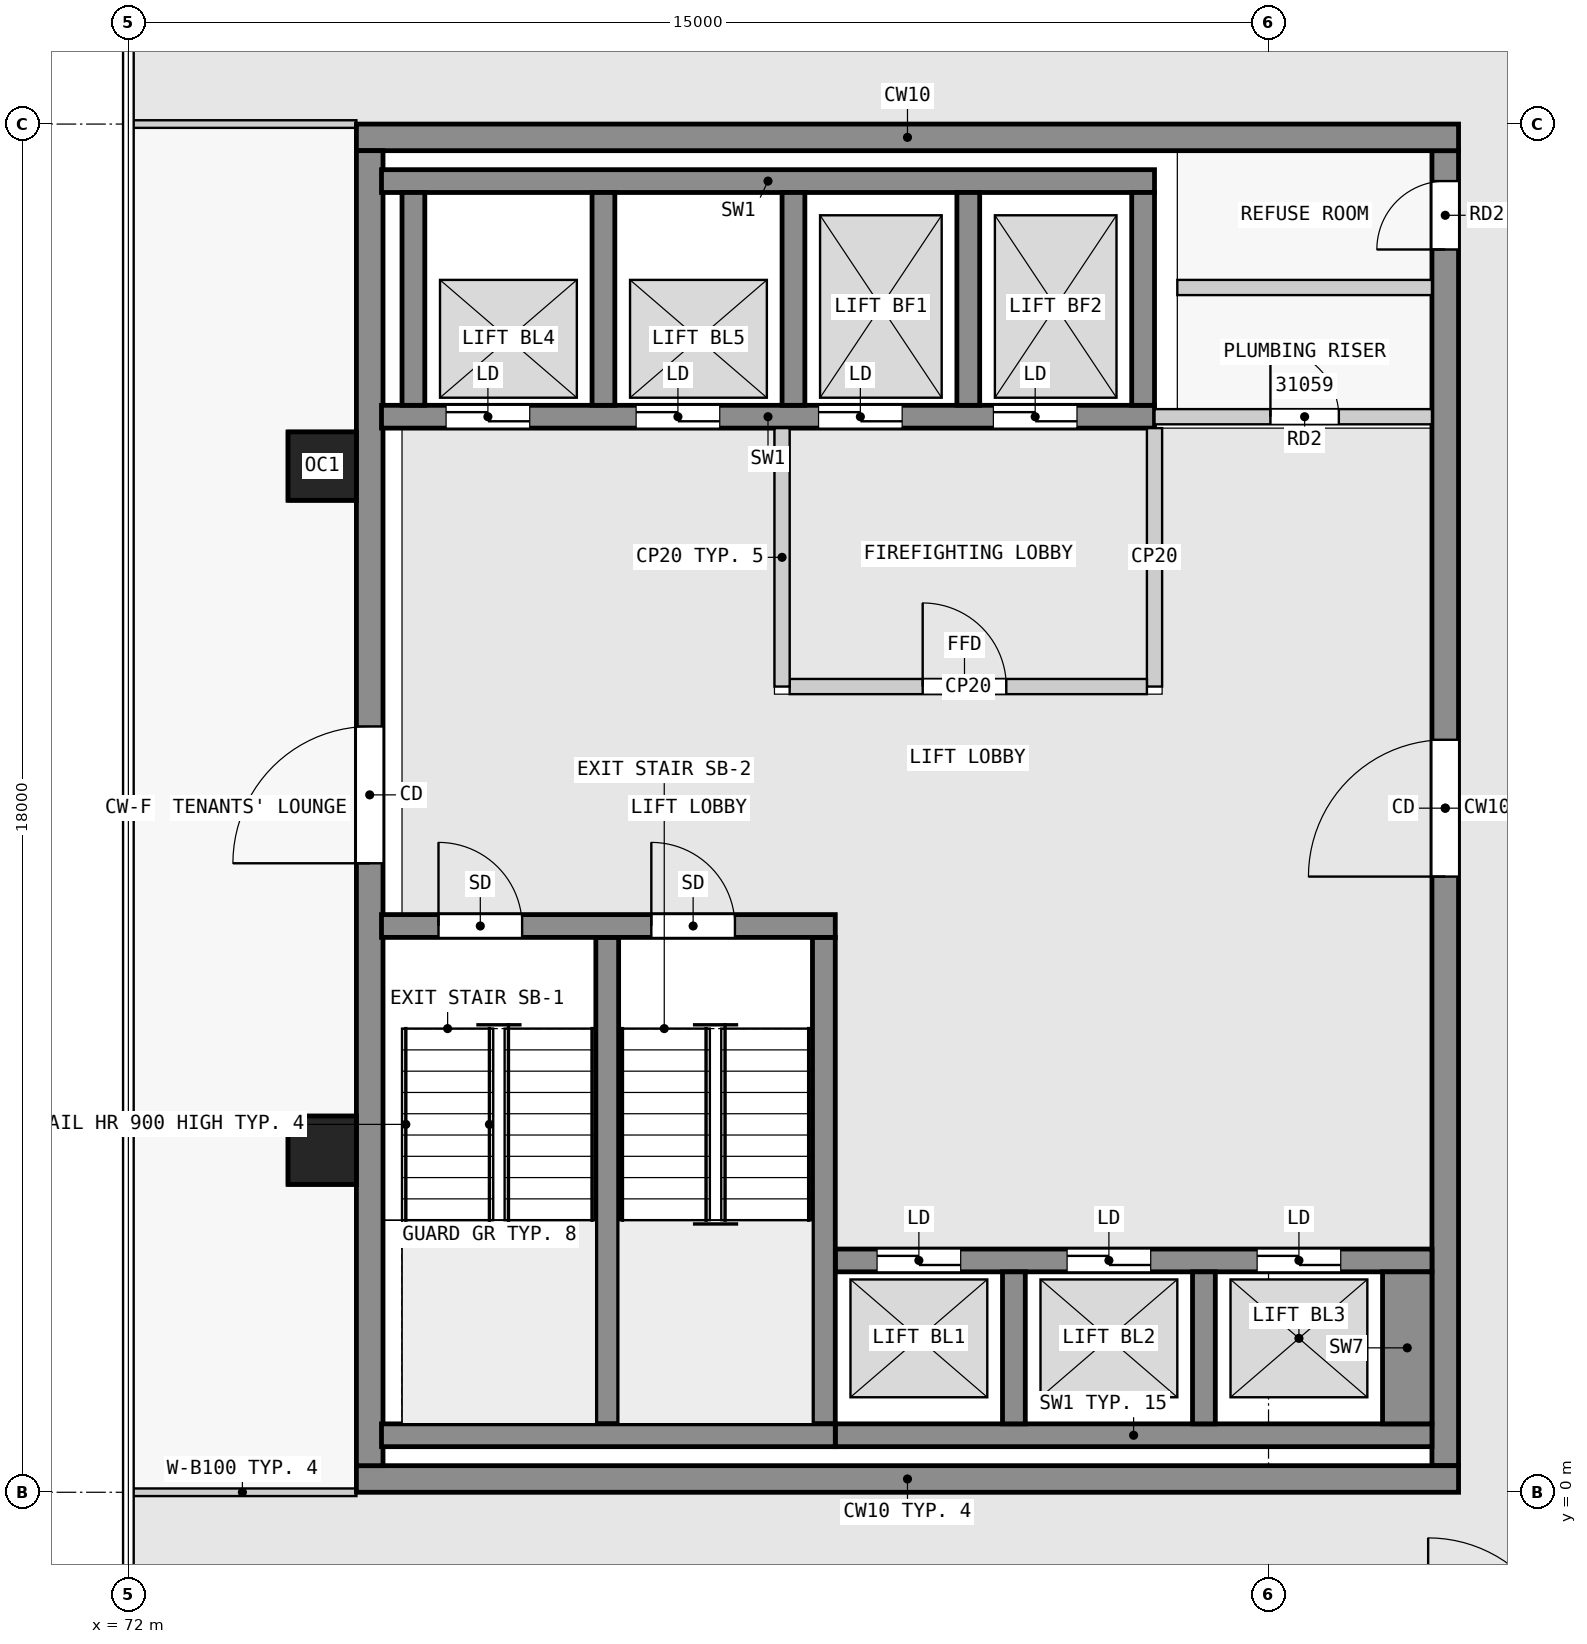
"""IFC4 building model, lengths in metres.
Left out: names, types, materials, properties, quantities, classifications, styles, units other than length and angle.
Written with IfcOpenShell. Run it as: python <this file> out.ifc"""

import sys

from ifc_helpers import new_model, si_unit, direction, frame, frame_2d, origin, origin_2d, place, context, subcontext, project, spatial, rectangle, extrude, element, fill, save


model = new_model("IFC4")
c1 = context("Model", 3, precision=1e-05, world=origin(), true_north=direction((0.0, 1.0)))
c2 = subcontext(c1, "Body", "Model", "MODEL_VIEW")
j1 = project(units=[si_unit("LENGTHUNIT", "METRE"), si_unit("PLANEANGLEUNIT", "RADIAN")], contexts=[c1])
p1 = place(None, origin())
s1 = spatial("IfcSite", under=j1, at=p1, CompositionType="ELEMENT")
p2 = place(p1, origin())
s2 = spatial("IfcBuilding", under=s1, at=p2, CompositionType="ELEMENT")
p3 = place(p2, frame((0.0, 0.0, 120.3)))
s3 = spatial("IfcBuildingStorey", under=s2, at=p3, CompositionType="ELEMENT", Elevation=120.3)
for number, where, z_axis, x_axis in (
    (1, (74.55, 13.5, 0.0), (0.0, 0.0, 1.0), (1.0, 0.0, 0.0)),
    (2, (74.55, 4.5, 0.0), (0.0, 0.0, 1.0), (1.0, 0.0, 0.0)),
):
    element("IfcColumn", number, at=place(p3, frame(where, z_axis=z_axis, x_axis=x_axis)), inside=s3, PredefinedType="COLUMN", context=c2, shape_type="SweptSolid", body=[
        extrude(rectangle(XDim=0.9, YDim=0.9, at=origin_2d()), origin(), (0.0, 0.0, 1.0), 3.5),
    ])
for number, where, z_axis, x_axis in (
    (3, (75.0, 0.175, 0.0), (0.0, 0.0, 1.0), (1.0, 0.0, 0.0)),
    (4, (75.0, 17.825, 0.0), (0.0, 0.0, 1.0), (1.0, 0.0, 0.0)),
):
    element("IfcWall", number, at=place(p3, frame(where, z_axis=z_axis, x_axis=x_axis)), inside=s3, PredefinedType="SHEAR", context=c2, shape_type="SweptSolid", body=[
        extrude(rectangle(XDim=14.5, YDim=0.35, at=frame_2d((7.25, 0.0))), origin(), (0.0, 0.0, 1.0), 3.2),
    ])
p4 = place(p3, frame((75.175, 0.35, 0.0), z_axis=(0.0, 0.0, 1.0), x_axis=(0.0, 1.0, 0.0)))
e5 = element("IfcWall", 5, at=p4, inside=s3, PredefinedType="SHEAR", context=c2, shape_type="SweptSolid", body=[
    extrude(rectangle(XDim=17.3, YDim=0.35, at=frame_2d((8.65, 0.0))), origin(), (0.0, 0.0, 1.0), 3.2),
])
p5 = place(p4, frame((7.925, 0.0, 0.0)))
e6 = element("IfcOpeningElement", 6, at=p5, cuts=e5, PredefinedType="OPENING", context=c2, shape_type="SweptSolid", body=[
    extrude(rectangle(XDim=1.8, YDim=2.1, at=frame_2d((0.9, 1.05))), frame((0.0, 0.185, 0.0), z_axis=(0.0, -1.0, 0.0), x_axis=(1.0, 0.0, 0.0)), (0.0, 0.0, 1.0), 0.37),
])
p6 = place(p3, frame((89.325, 0.35, 0.0), z_axis=(0.0, 0.0, 1.0), x_axis=(0.0, 1.0, 0.0)))
e7 = element("IfcWall", 7, at=p6, inside=s3, PredefinedType="SHEAR", context=c2, shape_type="SweptSolid", body=[
    extrude(rectangle(XDim=17.3, YDim=0.35, at=frame_2d((8.65, 0.0))), origin(), (0.0, 0.0, 1.0), 3.2),
])
p7 = place(p6, frame((7.75, 0.0, 0.0)))
e8 = element("IfcOpeningElement", 8, at=p7, cuts=e7, PredefinedType="OPENING", context=c2, shape_type="SweptSolid", body=[
    extrude(rectangle(XDim=1.8, YDim=2.1, at=frame_2d((0.9, 1.05))), frame((0.0, 0.185, 0.0), z_axis=(0.0, -1.0, 0.0), x_axis=(1.0, 0.0, 0.0)), (0.0, 0.0, 1.0), 0.37),
])
p8 = place(p6, frame((16.0, 0.0, 0.0)))
e9 = element("IfcOpeningElement", 9, at=p8, cuts=e7, PredefinedType="OPENING", context=c2, shape_type="SweptSolid", body=[
    extrude(rectangle(XDim=0.9, YDim=2.1, at=frame_2d((0.45, 1.05))), frame((0.0, 0.185, 0.0), z_axis=(0.0, -1.0, 0.0), x_axis=(1.0, 0.0, 0.0)), (0.0, 0.0, 1.0), 0.37),
])
p9 = place(p3, frame((75.33, 0.75, 0.0), z_axis=(0.0, 0.0, 1.0), x_axis=(1.0, 0.0, 0.0)))
e10 = element("IfcWall", 10, at=p9, inside=s3, PredefinedType="SHEAR", context=c2, shape_type="SweptSolid", body=[
    extrude(rectangle(XDim=5.97, YDim=0.3, at=frame_2d((2.985, 0.0))), origin(), (0.0, 0.0, 1.0), 3.2),
])
p10 = place(p3, frame((75.33, 7.45, 0.0), z_axis=(0.0, 0.0, 1.0), x_axis=(1.0, 0.0, 0.0)))
e11 = element("IfcWall", 11, at=p10, inside=s3, PredefinedType="SHEAR", context=c2, shape_type="SweptSolid", body=[
    extrude(rectangle(XDim=5.97, YDim=0.3, at=frame_2d((2.985, 0.0))), origin(), (0.0, 0.0, 1.0), 3.2),
])
p11 = place(p10, frame((0.75, 0.0, 0.0)))
e12 = element("IfcOpeningElement", 12, at=p11, cuts=e11, PredefinedType="OPENING", context=c2, shape_type="SweptSolid", body=[
    extrude(rectangle(XDim=1.1, YDim=2.1, at=frame_2d((0.55, 1.05))), frame((0.0, 0.16, 0.0), z_axis=(0.0, -1.0, 0.0), x_axis=(1.0, 0.0, 0.0)), (0.0, 0.0, 1.0), 0.32),
])
p12 = place(p10, frame((3.55, 0.0, 0.0)))
e13 = element("IfcOpeningElement", 13, at=p12, cuts=e11, PredefinedType="OPENING", context=c2, shape_type="SweptSolid", body=[
    extrude(rectangle(XDim=1.1, YDim=2.1, at=frame_2d((0.55, 1.05))), frame((0.0, 0.16, 0.0), z_axis=(0.0, -1.0, 0.0), x_axis=(1.0, 0.0, 0.0)), (0.0, 0.0, 1.0), 0.32),
])
for number, where, z_axis, x_axis in (
    (14, (78.3, 0.9, 0.0), (0.0, 0.0, 1.0), (0.0, 1.0, 0.0)),
    (15, (81.15, 0.9, 0.0), (0.0, 0.0, 1.0), (0.0, 1.0, 0.0)),
):
    element("IfcWall", number, at=place(p3, frame(where, z_axis=z_axis, x_axis=x_axis)), inside=s3, PredefinedType="SHEAR", context=c2, shape_type="SweptSolid", body=[
        extrude(rectangle(XDim=6.4, YDim=0.3, at=frame_2d((3.2, 0.0))), origin(), (0.0, 0.0, 1.0), 3.2),
    ])
p13 = place(p3, frame((81.3, 0.75, 0.0), z_axis=(0.0, 0.0, 1.0), x_axis=(1.0, 0.0, 0.0)))
e16 = element("IfcWall", 16, at=p13, inside=s3, PredefinedType="SHEAR", context=c2, shape_type="SweptSolid", body=[
    extrude(rectangle(XDim=7.85, YDim=0.3, at=frame_2d((3.925, 0.0))), origin(), (0.0, 0.0, 1.0), 3.2),
])
for number, where, z_axis, x_axis in (
    (17, (83.65, 0.9, 0.0), (0.0, 0.0, 1.0), (0.0, 1.0, 0.0)),
    (18, (86.15, 0.9, 0.0), (0.0, 0.0, 1.0), (0.0, 1.0, 0.0)),
):
    element("IfcWall", number, at=place(p3, frame(where, z_axis=z_axis, x_axis=x_axis)), inside=s3, PredefinedType="SHEAR", context=c2, shape_type="SweptSolid", body=[
        extrude(rectangle(XDim=2.0, YDim=0.3, at=frame_2d((1.0, 0.0))), origin(), (0.0, 0.0, 1.0), 3.2),
    ])
p14 = place(p3, frame((88.825, 0.9, 0.0), z_axis=(0.0, 0.0, 1.0), x_axis=(0.0, 1.0, 0.0)))
e19 = element("IfcWall", 19, at=p14, inside=s3, PredefinedType="SHEAR", context=c2, shape_type="SweptSolid", body=[
    extrude(rectangle(XDim=2.0, YDim=0.65, at=frame_2d((1.0, 0.0))), origin(), (0.0, 0.0, 1.0), 3.2),
])
p15 = place(p3, frame((81.3, 3.05, 0.0), z_axis=(0.0, 0.0, 1.0), x_axis=(1.0, 0.0, 0.0)))
e20 = element("IfcWall", 20, at=p15, inside=s3, PredefinedType="SHEAR", context=c2, shape_type="SweptSolid", body=[
    extrude(rectangle(XDim=7.85, YDim=0.3, at=frame_2d((3.925, 0.0))), origin(), (0.0, 0.0, 1.0), 3.2),
])
p16 = place(p15, frame((0.55, 0.0, 0.0)))
e21 = element("IfcOpeningElement", 21, at=p16, cuts=e20, PredefinedType="OPENING", context=c2, shape_type="SweptSolid", body=[
    extrude(rectangle(XDim=1.1, YDim=2.1, at=frame_2d((0.55, 1.05))), frame((0.0, 0.16, 0.0), z_axis=(0.0, -1.0, 0.0), x_axis=(1.0, 0.0, 0.0)), (0.0, 0.0, 1.0), 0.32),
])
p17 = place(p15, frame((3.05, 0.0, 0.0)))
e22 = element("IfcOpeningElement", 22, at=p17, cuts=e20, PredefinedType="OPENING", context=c2, shape_type="SweptSolid", body=[
    extrude(rectangle(XDim=1.1, YDim=2.1, at=frame_2d((0.55, 1.05))), frame((0.0, 0.16, 0.0), z_axis=(0.0, -1.0, 0.0), x_axis=(1.0, 0.0, 0.0)), (0.0, 0.0, 1.0), 0.32),
])
p18 = place(p15, frame((5.55, 0.0, 0.0)))
e23 = element("IfcOpeningElement", 23, at=p18, cuts=e20, PredefinedType="OPENING", context=c2, shape_type="SweptSolid", body=[
    extrude(rectangle(XDim=1.1, YDim=2.1, at=frame_2d((0.55, 1.05))), frame((0.0, 0.16, 0.0), z_axis=(0.0, -1.0, 0.0), x_axis=(1.0, 0.0, 0.0)), (0.0, 0.0, 1.0), 0.32),
])
p19 = place(p3, frame((75.33, 17.25, 0.0), z_axis=(0.0, 0.0, 1.0), x_axis=(1.0, 0.0, 0.0)))
e24 = element("IfcWall", 24, at=p19, inside=s3, PredefinedType="SHEAR", context=c2, shape_type="SweptSolid", body=[
    extrude(rectangle(XDim=10.17, YDim=0.3, at=frame_2d((5.085, 0.0))), origin(), (0.0, 0.0, 1.0), 3.2),
])
p20 = place(p3, frame((75.33, 14.15, 0.0), z_axis=(0.0, 0.0, 1.0), x_axis=(1.0, 0.0, 0.0)))
e25 = element("IfcWall", 25, at=p20, inside=s3, PredefinedType="SHEAR", context=c2, shape_type="SweptSolid", body=[
    extrude(rectangle(XDim=10.17, YDim=0.3, at=frame_2d((5.085, 0.0))), origin(), (0.0, 0.0, 1.0), 3.2),
])
p21 = place(p20, frame((0.85, 0.0, 0.0)))
e26 = element("IfcOpeningElement", 26, at=p21, cuts=e25, PredefinedType="OPENING", context=c2, shape_type="SweptSolid", body=[
    extrude(rectangle(XDim=1.1, YDim=2.1, at=frame_2d((0.55, 1.05))), frame((0.0, 0.16, 0.0), z_axis=(0.0, -1.0, 0.0), x_axis=(1.0, 0.0, 0.0)), (0.0, 0.0, 1.0), 0.32),
])
p22 = place(p20, frame((3.35, 0.0, 0.0)))
e27 = element("IfcOpeningElement", 27, at=p22, cuts=e25, PredefinedType="OPENING", context=c2, shape_type="SweptSolid", body=[
    extrude(rectangle(XDim=1.1, YDim=2.1, at=frame_2d((0.55, 1.05))), frame((0.0, 0.16, 0.0), z_axis=(0.0, -1.0, 0.0), x_axis=(1.0, 0.0, 0.0)), (0.0, 0.0, 1.0), 0.32),
])
p23 = place(p20, frame((5.75, 0.0, 0.0)))
e28 = element("IfcOpeningElement", 28, at=p23, cuts=e25, PredefinedType="OPENING", context=c2, shape_type="SweptSolid", body=[
    extrude(rectangle(XDim=1.1, YDim=2.1, at=frame_2d((0.55, 1.05))), frame((0.0, 0.16, 0.0), z_axis=(0.0, -1.0, 0.0), x_axis=(1.0, 0.0, 0.0)), (0.0, 0.0, 1.0), 0.32),
])
p24 = place(p20, frame((8.05, 0.0, 0.0)))
e29 = element("IfcOpeningElement", 29, at=p24, cuts=e25, PredefinedType="OPENING", context=c2, shape_type="SweptSolid", body=[
    extrude(rectangle(XDim=1.1, YDim=2.1, at=frame_2d((0.55, 1.05))), frame((0.0, 0.16, 0.0), z_axis=(0.0, -1.0, 0.0), x_axis=(1.0, 0.0, 0.0)), (0.0, 0.0, 1.0), 0.32),
])
for number, where, z_axis, x_axis in (
    (30, (75.75, 14.3, 0.0), (0.0, 0.0, 1.0), (0.0, 1.0, 0.0)),
    (31, (78.25, 14.3, 0.0), (0.0, 0.0, 1.0), (0.0, 1.0, 0.0)),
    (32, (80.75, 14.3, 0.0), (0.0, 0.0, 1.0), (0.0, 1.0, 0.0)),
    (33, (83.05, 14.3, 0.0), (0.0, 0.0, 1.0), (0.0, 1.0, 0.0)),
    (34, (85.35, 14.3, 0.0), (0.0, 0.0, 1.0), (0.0, 1.0, 0.0)),
):
    element("IfcWall", number, at=place(p3, frame(where, z_axis=z_axis, x_axis=x_axis)), inside=s3, PredefinedType="SHEAR", context=c2, shape_type="SweptSolid", body=[
        extrude(rectangle(XDim=2.8, YDim=0.3, at=frame_2d((1.4, 0.0))), origin(), (0.0, 0.0, 1.0), 3.2),
    ])
p25 = place(p3, frame((80.6, 10.6, 0.0), z_axis=(0.0, 0.0, 1.0), x_axis=(0.0, 1.0, 0.0)))
e35 = element("IfcWall", 35, at=p25, inside=s3, PredefinedType="PARTITIONING", context=c2, shape_type="SweptSolid", body=[
    extrude(rectangle(XDim=3.4, YDim=0.2, at=frame_2d((1.7, 0.0))), origin(), (0.0, 0.0, 1.0), 3.2),
])
p26 = place(p3, frame((80.7, 10.6, 0.0), z_axis=(0.0, 0.0, 1.0), x_axis=(1.0, 0.0, 0.0)))
e36 = element("IfcWall", 36, at=p26, inside=s3, PredefinedType="PARTITIONING", context=c2, shape_type="SweptSolid", body=[
    extrude(rectangle(XDim=4.7, YDim=0.2, at=frame_2d((2.35, 0.0))), origin(), (0.0, 0.0, 1.0), 3.2),
])
p27 = place(p26, frame((1.75, 0.0, 0.0)))
e37 = element("IfcOpeningElement", 37, at=p27, cuts=e36, PredefinedType="OPENING", context=c2, shape_type="SweptSolid", body=[
    extrude(rectangle(XDim=1.1, YDim=2.1, at=frame_2d((0.55, 1.05))), frame((0.0, 0.11, 0.0), z_axis=(0.0, -1.0, 0.0), x_axis=(1.0, 0.0, 0.0)), (0.0, 0.0, 1.0), 0.22),
])
p28 = place(p3, frame((85.5, 10.6, 0.0), z_axis=(0.0, 0.0, 1.0), x_axis=(0.0, 1.0, 0.0)))
e38 = element("IfcWall", 38, at=p28, inside=s3, PredefinedType="PARTITIONING", context=c2, shape_type="SweptSolid", body=[
    extrude(rectangle(XDim=3.4, YDim=0.2, at=frame_2d((1.7, 0.0))), origin(), (0.0, 0.0, 1.0), 3.2),
])
p29 = place(p3, frame((85.5, 14.15, 0.0), z_axis=(0.0, 0.0, 1.0), x_axis=(1.0, 0.0, 0.0)))
e39 = element("IfcWall", 39, at=p29, inside=s3, PredefinedType="PARTITIONING", context=c2, shape_type="SweptSolid", body=[
    extrude(rectangle(XDim=3.65, YDim=0.2, at=frame_2d((1.825, 0.0))), origin(), (0.0, 0.0, 1.0), 3.2),
])
p30 = place(p29, frame((1.525, 0.0, 0.0)))
e40 = element("IfcOpeningElement", 40, at=p30, cuts=e39, PredefinedType="OPENING", context=c2, shape_type="SweptSolid", body=[
    extrude(rectangle(XDim=0.9, YDim=2.1, at=frame_2d((0.45, 1.05))), frame((0.0, 0.11, 0.0), z_axis=(0.0, -1.0, 0.0), x_axis=(1.0, 0.0, 0.0)), (0.0, 0.0, 1.0), 0.22),
])
p31 = place(p3, frame((85.8, 15.85, 0.0), z_axis=(0.0, 0.0, 1.0), x_axis=(1.0, 0.0, 0.0)))
e41 = element("IfcWall", 41, at=p31, inside=s3, PredefinedType="PARTITIONING", context=c2, shape_type="SweptSolid", body=[
    extrude(rectangle(XDim=3.35, YDim=0.2, at=frame_2d((1.675, 0.0))), origin(), (0.0, 0.0, 1.0), 3.2),
])
for number, where, z_axis, x_axis in (
    (42, (72.0, 0.0, 0.0), (0.0, 0.0, 1.0), (1.0, 0.0, 0.0)),
    (43, (72.0, 18.0, 0.0), (0.0, 0.0, 1.0), (1.0, 0.0, 0.0)),
):
    element("IfcWall", number, at=place(p3, frame(where, z_axis=z_axis, x_axis=x_axis)), inside=s3, PredefinedType="PARTITIONING", context=c2, shape_type="SweptSolid", body=[
        extrude(rectangle(XDim=3.0, YDim=0.1, at=frame_2d((1.5, 0.0))), origin(), (0.0, 0.0, 1.0), 3.2),
    ])
p32 = place(p27, origin())
e44 = element("IfcDoor", 44, at=p32, inside=s3, OperationType="SINGLE_SWING_LEFT", PredefinedType="DOOR", context=c2, shape_type="SweptSolid", body=[
    extrude(rectangle(XDim=1.1, YDim=2.1, at=frame_2d((0.55, 1.05))), frame((0.0, 0.025, 0.0), z_axis=(0.0, -1.0, 0.0), x_axis=(1.0, 0.0, 0.0)), (0.0, 0.0, 1.0), 0.05),
])
fill(e37, e44)
p33 = place(p16, origin())
e45 = element("IfcDoor", 45, at=p33, inside=s3, OperationType="DOUBLE_DOOR_SLIDING", PredefinedType="DOOR", context=c2, shape_type="SweptSolid", body=[
    extrude(rectangle(XDim=1.1, YDim=2.1, at=frame_2d((0.55, 1.05))), frame((0.0, 0.025, 0.0), z_axis=(0.0, -1.0, 0.0), x_axis=(1.0, 0.0, 0.0)), (0.0, 0.0, 1.0), 0.05),
])
fill(e21, e45)
p34 = place(p17, origin())
e46 = element("IfcDoor", 46, at=p34, inside=s3, OperationType="DOUBLE_DOOR_SLIDING", PredefinedType="DOOR", context=c2, shape_type="SweptSolid", body=[
    extrude(rectangle(XDim=1.1, YDim=2.1, at=frame_2d((0.55, 1.05))), frame((0.0, 0.025, 0.0), z_axis=(0.0, -1.0, 0.0), x_axis=(1.0, 0.0, 0.0)), (0.0, 0.0, 1.0), 0.05),
])
fill(e22, e46)
p35 = place(p18, origin())
e47 = element("IfcDoor", 47, at=p35, inside=s3, OperationType="DOUBLE_DOOR_SLIDING", PredefinedType="DOOR", context=c2, shape_type="SweptSolid", body=[
    extrude(rectangle(XDim=1.1, YDim=2.1, at=frame_2d((0.55, 1.05))), frame((0.0, 0.025, 0.0), z_axis=(0.0, -1.0, 0.0), x_axis=(1.0, 0.0, 0.0)), (0.0, 0.0, 1.0), 0.05),
])
fill(e23, e47)
p36 = place(p21, origin())
e48 = element("IfcDoor", 48, at=p36, inside=s3, OperationType="DOUBLE_DOOR_SLIDING", PredefinedType="DOOR", context=c2, shape_type="SweptSolid", body=[
    extrude(rectangle(XDim=1.1, YDim=2.1, at=frame_2d((0.55, 1.05))), frame((0.0, 0.025, 0.0), z_axis=(0.0, -1.0, 0.0), x_axis=(1.0, 0.0, 0.0)), (0.0, 0.0, 1.0), 0.05),
])
fill(e26, e48)
p37 = place(p22, origin())
e49 = element("IfcDoor", 49, at=p37, inside=s3, OperationType="DOUBLE_DOOR_SLIDING", PredefinedType="DOOR", context=c2, shape_type="SweptSolid", body=[
    extrude(rectangle(XDim=1.1, YDim=2.1, at=frame_2d((0.55, 1.05))), frame((0.0, 0.025, 0.0), z_axis=(0.0, -1.0, 0.0), x_axis=(1.0, 0.0, 0.0)), (0.0, 0.0, 1.0), 0.05),
])
fill(e27, e49)
p38 = place(p23, origin())
e50 = element("IfcDoor", 50, at=p38, inside=s3, OperationType="DOUBLE_DOOR_SLIDING", PredefinedType="DOOR", context=c2, shape_type="SweptSolid", body=[
    extrude(rectangle(XDim=1.1, YDim=2.1, at=frame_2d((0.55, 1.05))), frame((0.0, 0.025, 0.0), z_axis=(0.0, -1.0, 0.0), x_axis=(1.0, 0.0, 0.0)), (0.0, 0.0, 1.0), 0.05),
])
fill(e28, e50)
p39 = place(p24, origin())
e51 = element("IfcDoor", 51, at=p39, inside=s3, OperationType="DOUBLE_DOOR_SLIDING", PredefinedType="DOOR", context=c2, shape_type="SweptSolid", body=[
    extrude(rectangle(XDim=1.1, YDim=2.1, at=frame_2d((0.55, 1.05))), frame((0.0, 0.025, 0.0), z_axis=(0.0, -1.0, 0.0), x_axis=(1.0, 0.0, 0.0)), (0.0, 0.0, 1.0), 0.05),
])
fill(e29, e51)
p40 = place(p11, origin())
e52 = element("IfcDoor", 52, at=p40, inside=s3, OperationType="SINGLE_SWING_RIGHT", PredefinedType="DOOR", context=c2, shape_type="SweptSolid", body=[
    extrude(rectangle(XDim=1.1, YDim=2.1, at=frame_2d((0.55, 1.05))), frame((0.0, 0.025, 0.0), z_axis=(0.0, -1.0, 0.0), x_axis=(1.0, 0.0, 0.0)), (0.0, 0.0, 1.0), 0.05),
])
fill(e12, e52)
p41 = place(p12, origin())
e53 = element("IfcDoor", 53, at=p41, inside=s3, OperationType="SINGLE_SWING_LEFT", PredefinedType="DOOR", context=c2, shape_type="SweptSolid", body=[
    extrude(rectangle(XDim=1.1, YDim=2.1, at=frame_2d((0.55, 1.05))), frame((0.0, 0.025, 0.0), z_axis=(0.0, -1.0, 0.0), x_axis=(1.0, 0.0, 0.0)), (0.0, 0.0, 1.0), 0.05),
])
fill(e13, e53)
p42 = place(p5, origin())
e54 = element("IfcDoor", 54, at=p42, inside=s3, OperationType="DOUBLE_DOOR_SINGLE_SWING", PredefinedType="DOOR", context=c2, shape_type="SweptSolid", body=[
    extrude(rectangle(XDim=1.8, YDim=2.1, at=frame_2d((0.9, 1.05))), frame((0.0, 0.025, 0.0), z_axis=(0.0, -1.0, 0.0), x_axis=(1.0, 0.0, 0.0)), (0.0, 0.0, 1.0), 0.05),
])
fill(e6, e54)
p43 = place(p7, origin())
e55 = element("IfcDoor", 55, at=p43, inside=s3, OperationType="DOUBLE_DOOR_SINGLE_SWING", PredefinedType="DOOR", context=c2, shape_type="SweptSolid", body=[
    extrude(rectangle(XDim=1.8, YDim=2.1, at=frame_2d((0.9, 1.05))), frame((0.0, 0.025, 0.0), z_axis=(0.0, -1.0, 0.0), x_axis=(1.0, 0.0, 0.0)), (0.0, 0.0, 1.0), 0.05),
])
fill(e8, e55)
p44 = place(p30, origin())
e56 = element("IfcDoor", 56, at=p44, inside=s3, OperationType="SINGLE_SWING_LEFT", PredefinedType="DOOR", context=c2, shape_type="SweptSolid", body=[
    extrude(rectangle(XDim=0.9, YDim=2.1, at=frame_2d((0.45, 1.05))), frame((0.0, 0.025, 0.0), z_axis=(0.0, -1.0, 0.0), x_axis=(1.0, 0.0, 0.0)), (0.0, 0.0, 1.0), 0.05),
])
fill(e40, e56)
p45 = place(p8, origin())
e57 = element("IfcDoor", 57, at=p45, inside=s3, OperationType="SINGLE_SWING_LEFT", PredefinedType="DOOR", context=c2, shape_type="SweptSolid", body=[
    extrude(rectangle(XDim=0.9, YDim=2.1, at=frame_2d((0.45, 1.05))), frame((0.0, 0.025, 0.0), z_axis=(0.0, -1.0, 0.0), x_axis=(1.0, 0.0, 0.0)), (0.0, 0.0, 1.0), 0.05),
])
fill(e9, e57)
save(model, sys.argv[1])
